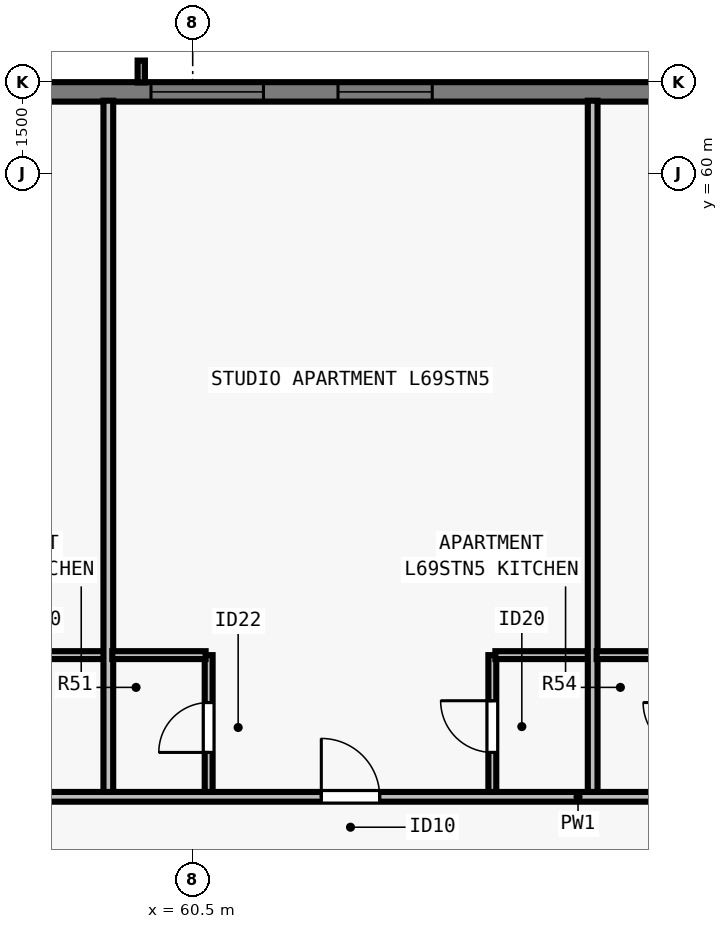
"""IFC4 building model, lengths in metres.
Left out: names, types, materials, properties, quantities, classifications, styles, units other than length and angle.
Written with IfcOpenShell. Run it as: python <this file> out.ifc"""

import sys

from ifc_helpers import new_model, si_unit, direction, frame, frame_2d, origin, place, context, subcontext, project, spatial, rectangle, extrude, element, fill, save


model = new_model("IFC4")
c1 = context("Model", 3, precision=1e-05, world=origin(), true_north=direction((0.0, 1.0)))
c2 = subcontext(c1, "Body", "Model", "MODEL_VIEW")
j1 = project(units=[si_unit("LENGTHUNIT", "METRE"), si_unit("PLANEANGLEUNIT", "RADIAN")], contexts=[c1])
p1 = place(None, origin())
s1 = spatial("IfcSite", under=j1, at=p1, CompositionType="ELEMENT")
p2 = place(p1, origin())
s2 = spatial("IfcBuilding", under=s1, at=p2, CompositionType="ELEMENT")
p3 = place(p2, frame((0.0, 0.0, 251.5)))
s3 = spatial("IfcBuildingStorey", under=s2, at=p3, CompositionType="ELEMENT", Elevation=251.5)
p4 = place(p3, frame((34.5, 61.34, 0.0), z_axis=(0.0, 0.0, 1.0), x_axis=(1.0, 0.0, 0.0)))
e1 = element("IfcWall", 1, at=p4, inside=s3, PredefinedType="SOLIDWALL", context=c2, shape_type="SweptSolid", body=[
    extrude(rectangle(XDim=34.702, YDim=0.32, at=frame_2d((17.351, 0.0))), origin(), (0.0, 0.0, 1.0), 3.29),
])
p5 = place(p4, frame((4.613, 0.0, 0.8)))
e2 = element("IfcOpeningElement", 2, at=p5, cuts=e1, PredefinedType="OPENING", context=c2, shape_type="SweptSolid", body=[
    extrude(rectangle(XDim=1.85, YDim=1.678, at=frame_2d((0.925, 0.839))), frame((0.0, 0.17, 0.0), z_axis=(0.0, -1.0, 0.0), x_axis=(1.0, 0.0, 0.0)), (0.0, 0.0, 1.0), 0.34),
])
p6 = place(p4, frame((7.688, 0.0, 0.8)))
e3 = element("IfcOpeningElement", 3, at=p6, cuts=e1, PredefinedType="OPENING", context=c2, shape_type="SweptSolid", body=[
    extrude(rectangle(XDim=1.55, YDim=1.678, at=frame_2d((0.775, 0.839))), frame((0.0, 0.17, 0.0), z_axis=(0.0, -1.0, 0.0), x_axis=(1.0, 0.0, 0.0)), (0.0, 0.0, 1.0), 0.34),
])
p7 = place(p4, frame((14.888, 0.0, 0.8)))
e4 = element("IfcOpeningElement", 4, at=p7, cuts=e1, PredefinedType="OPENING", context=c2, shape_type="SweptSolid", body=[
    extrude(rectangle(XDim=1.55, YDim=1.678, at=frame_2d((0.775, 0.839))), frame((0.0, 0.17, 0.0), z_axis=(0.0, -1.0, 0.0), x_axis=(1.0, 0.0, 0.0)), (0.0, 0.0, 1.0), 0.34),
])
p8 = place(p4, frame((18.564, 0.0, 0.8)))
e5 = element("IfcOpeningElement", 5, at=p8, cuts=e1, PredefinedType="OPENING", context=c2, shape_type="SweptSolid", body=[
    extrude(rectangle(XDim=1.85, YDim=1.678, at=frame_2d((0.925, 0.839))), frame((0.0, 0.17, 0.0), z_axis=(0.0, -1.0, 0.0), x_axis=(1.0, 0.0, 0.0)), (0.0, 0.0, 1.0), 0.34),
])
p9 = place(p4, frame((25.314, 0.0, 0.8)))
e6 = element("IfcOpeningElement", 6, at=p9, cuts=e1, PredefinedType="OPENING", context=c2, shape_type="SweptSolid", body=[
    extrude(rectangle(XDim=1.85, YDim=1.678, at=frame_2d((0.925, 0.839))), frame((0.0, 0.17, 0.0), z_axis=(0.0, -1.0, 0.0), x_axis=(1.0, 0.0, 0.0)), (0.0, 0.0, 1.0), 0.34),
])
p10 = place(p4, frame((28.389, 0.0, 0.8)))
e7 = element("IfcOpeningElement", 7, at=p10, cuts=e1, PredefinedType="OPENING", context=c2, shape_type="SweptSolid", body=[
    extrude(rectangle(XDim=1.55, YDim=1.678, at=frame_2d((0.775, 0.839))), frame((0.0, 0.17, 0.0), z_axis=(0.0, -1.0, 0.0), x_axis=(1.0, 0.0, 0.0)), (0.0, 0.0, 1.0), 0.34),
])
p11 = place(p3, frame((29.805, 49.748, 0.0), z_axis=(0.0, 0.0, 1.0), x_axis=(1.0, 0.0, 0.0)))
e8 = element("IfcWall", 8, at=p11, inside=s3, PredefinedType="PARTITIONING", context=c2, shape_type="SweptSolid", body=[
    extrude(rectangle(XDim=44.39, YDim=0.16, at=frame_2d((22.195, 0.0))), origin(), (0.0, 0.0, 1.0), 2.958),
])
p12 = place(p11, frame((3.494, 0.0, 0.0)))
e9 = element("IfcOpeningElement", 9, at=p12, cuts=e8, PredefinedType="OPENING", context=c2, shape_type="SweptSolid", body=[
    extrude(rectangle(XDim=0.96, YDim=2.18, at=frame_2d((0.48, 1.09))), frame((0.0, 0.09, 0.0), z_axis=(0.0, -1.0, 0.0), x_axis=(1.0, 0.0, 0.0)), (0.0, 0.0, 1.0), 0.18),
])
p13 = place(p11, frame((10.73, 0.0, 0.0)))
e10 = element("IfcOpeningElement", 10, at=p13, cuts=e8, PredefinedType="OPENING", context=c2, shape_type="SweptSolid", body=[
    extrude(rectangle(XDim=0.96, YDim=2.18, at=frame_2d((0.48, 1.09))), frame((0.0, 0.09, 0.0), z_axis=(0.0, -1.0, 0.0), x_axis=(1.0, 0.0, 0.0)), (0.0, 0.0, 1.0), 0.18),
])
p14 = place(p11, frame((18.09, 0.0, 0.0)))
e11 = element("IfcOpeningElement", 11, at=p14, cuts=e8, PredefinedType="OPENING", context=c2, shape_type="SweptSolid", body=[
    extrude(rectangle(XDim=0.96, YDim=2.18, at=frame_2d((0.48, 1.09))), frame((0.0, 0.09, 0.0), z_axis=(0.0, -1.0, 0.0), x_axis=(1.0, 0.0, 0.0)), (0.0, 0.0, 1.0), 0.18),
])
p15 = place(p11, frame((25.45, 0.0, 0.0)))
e12 = element("IfcOpeningElement", 12, at=p15, cuts=e8, PredefinedType="OPENING", context=c2, shape_type="SweptSolid", body=[
    extrude(rectangle(XDim=0.96, YDim=2.18, at=frame_2d((0.48, 1.09))), frame((0.0, 0.09, 0.0), z_axis=(0.0, -1.0, 0.0), x_axis=(1.0, 0.0, 0.0)), (0.0, 0.0, 1.0), 0.18),
])
p16 = place(p11, frame((32.81, 0.0, 0.0)))
e13 = element("IfcOpeningElement", 13, at=p16, cuts=e8, PredefinedType="OPENING", context=c2, shape_type="SweptSolid", body=[
    extrude(rectangle(XDim=0.96, YDim=2.18, at=frame_2d((0.48, 1.09))), frame((0.0, 0.09, 0.0), z_axis=(0.0, -1.0, 0.0), x_axis=(1.0, 0.0, 0.0)), (0.0, 0.0, 1.0), 0.18),
])
p17 = place(p11, frame((40.294, 0.0, 0.0)))
e14 = element("IfcOpeningElement", 14, at=p17, cuts=e8, PredefinedType="OPENING", context=c2, shape_type="SweptSolid", body=[
    extrude(rectangle(XDim=0.96, YDim=2.18, at=frame_2d((0.48, 1.09))), frame((0.0, 0.09, 0.0), z_axis=(0.0, -1.0, 0.0), x_axis=(1.0, 0.0, 0.0)), (0.0, 0.0, 1.0), 0.18),
])
p18 = place(p3, frame((57.512, 52.077, 0.0), z_axis=(0.0, 0.0, 1.0), x_axis=(1.0, 0.0, 0.0)))
e15 = element("IfcWall", 15, at=p18, inside=s3, PredefinedType="PLUMBINGWALL", context=c2, shape_type="SweptSolid", body=[
    extrude(rectangle(XDim=1.6, YDim=0.13, at=frame_2d((0.8, 0.0))), origin(), (0.0, 0.0, 1.0), 3.29),
])
p19 = place(p3, frame((59.113, 49.827, 0.0), z_axis=(0.0, 0.0, 1.0), x_axis=(0.0, 1.0, 0.0)))
e16 = element("IfcWall", 16, at=p19, inside=s3, PredefinedType="PARTITIONING", context=c2, shape_type="SweptSolid", body=[
    extrude(rectangle(XDim=11.368, YDim=0.16, at=frame_2d((5.684, 0.0))), origin(), (0.0, 0.0, 1.0), 3.29),
])
p20 = place(p3, frame((60.762, 49.827, 0.0), z_axis=(0.0, 0.0, 1.0), x_axis=(0.0, 1.0, 0.0)))
e17 = element("IfcWall", 17, at=p20, inside=s3, PredefinedType="PLUMBINGWALL", context=c2, shape_type="SweptSolid", body=[
    extrude(rectangle(XDim=2.25, YDim=0.13, at=frame_2d((1.125, 0.0))), origin(), (0.0, 0.0, 1.0), 3.29),
])
p21 = place(p20, frame((0.65, 0.0, 0.0)))
e18 = element("IfcOpeningElement", 18, at=p21, cuts=e17, PredefinedType="OPENING", context=c2, shape_type="SweptSolid", body=[
    extrude(rectangle(XDim=0.82, YDim=2.1, at=frame_2d((0.41, 1.05))), frame((0.0, 0.075, 0.0), z_axis=(0.0, -1.0, 0.0), x_axis=(1.0, 0.0, 0.0)), (0.0, 0.0, 1.0), 0.15),
])
p22 = place(p3, frame((59.177, 52.077, 0.0), z_axis=(0.0, 0.0, 1.0), x_axis=(1.0, 0.0, 0.0)))
e19 = element("IfcWall", 19, at=p22, inside=s3, PredefinedType="PLUMBINGWALL", context=c2, shape_type="SweptSolid", body=[
    extrude(rectangle(XDim=1.535, YDim=0.13, at=frame_2d((0.768, 0.0))), origin(), (0.0, 0.0, 1.0), 3.29),
])
p23 = place(p3, frame((65.427, 49.827, 0.0), z_axis=(0.0, 0.0, 1.0), x_axis=(0.0, 1.0, 0.0)))
e20 = element("IfcWall", 20, at=p23, inside=s3, PredefinedType="PLUMBINGWALL", context=c2, shape_type="SweptSolid", body=[
    extrude(rectangle(XDim=2.25, YDim=0.13, at=frame_2d((1.125, 0.0))), origin(), (0.0, 0.0, 1.0), 3.29),
])
p24 = place(p23, frame((0.65, 0.0, 0.0)))
e21 = element("IfcOpeningElement", 21, at=p24, cuts=e20, PredefinedType="OPENING", context=c2, shape_type="SweptSolid", body=[
    extrude(rectangle(XDim=0.85, YDim=2.1, at=frame_2d((0.425, 1.05))), frame((0.0, 0.075, 0.0), z_axis=(0.0, -1.0, 0.0), x_axis=(1.0, 0.0, 0.0)), (0.0, 0.0, 1.0), 0.15),
])
p25 = place(p3, frame((65.478, 52.077, 0.0), z_axis=(0.0, 0.0, 1.0), x_axis=(1.0, 0.0, 0.0)))
e22 = element("IfcWall", 22, at=p25, inside=s3, PredefinedType="PLUMBINGWALL", context=c2, shape_type="SweptSolid", body=[
    extrude(rectangle(XDim=1.6, YDim=0.13, at=frame_2d((0.8, 0.0))), origin(), (0.0, 0.0, 1.0), 3.29),
])
p26 = place(p3, frame((67.077, 49.827, 0.0), z_axis=(0.0, 0.0, 1.0), x_axis=(0.0, 1.0, 0.0)))
e23 = element("IfcWall", 23, at=p26, inside=s3, PredefinedType="PARTITIONING", context=c2, shape_type="SweptSolid", body=[
    extrude(rectangle(XDim=11.368, YDim=0.16, at=frame_2d((5.684, 0.0))), origin(), (0.0, 0.0, 1.0), 2.573),
])
p27 = place(p3, frame((67.143, 52.077, 0.0), z_axis=(0.0, 0.0, 1.0), x_axis=(1.0, 0.0, 0.0)))
e24 = element("IfcWall", 24, at=p27, inside=s3, PredefinedType="PLUMBINGWALL", context=c2, shape_type="SweptSolid", body=[
    extrude(rectangle(XDim=1.535, YDim=0.13, at=frame_2d((0.768, 0.0))), origin(), (0.0, 0.0, 1.0), 2.958),
])
p28 = place(p9, origin())
e25 = element("IfcWindow", 25, at=p28, inside=s3, PartitioningType="SINGLE_PANEL", PredefinedType="WINDOW", context=c2, shape_type="SweptSolid", body=[
    extrude(rectangle(XDim=1.85, YDim=1.678, at=frame_2d((0.925, 0.839))), frame((0.0, -0.05, 0.0), z_axis=(0.0, -1.0, 0.0), x_axis=(1.0, 0.0, 0.0)), (0.0, 0.0, 1.0), 0.06),
])
fill(e6, e25)
p29 = place(p10, origin())
e26 = element("IfcWindow", 26, at=p29, inside=s3, PartitioningType="SINGLE_PANEL", PredefinedType="WINDOW", context=c2, shape_type="SweptSolid", body=[
    extrude(rectangle(XDim=1.55, YDim=1.678, at=frame_2d((0.775, 0.839))), frame((0.0, -0.05, 0.0), z_axis=(0.0, -1.0, 0.0), x_axis=(1.0, 0.0, 0.0)), (0.0, 0.0, 1.0), 0.06),
])
fill(e7, e26)
p30 = place(p21, origin())
e27 = element("IfcDoor", 27, at=p30, inside=s3, OperationType="SINGLE_SWING_LEFT", PredefinedType="DOOR", context=c2, shape_type="SweptSolid", body=[
    extrude(rectangle(XDim=0.82, YDim=2.1, at=frame_2d((0.41, 1.05))), frame((0.0, 0.025, 0.0), z_axis=(0.0, -1.0, 0.0), x_axis=(1.0, 0.0, 0.0)), (0.0, 0.0, 1.0), 0.05),
])
fill(e18, e27)
p31 = place(p24, origin())
e28 = element("IfcDoor", 28, at=p31, inside=s3, OperationType="SINGLE_SWING_RIGHT", PredefinedType="DOOR", context=c2, shape_type="SweptSolid", body=[
    extrude(rectangle(XDim=0.85, YDim=2.1, at=frame_2d((0.425, 1.05))), frame((0.0, 0.025, 0.0), z_axis=(0.0, -1.0, 0.0), x_axis=(1.0, 0.0, 0.0)), (0.0, 0.0, 1.0), 0.05),
])
fill(e21, e28)
p32 = place(p16, origin())
e29 = element("IfcDoor", 29, at=p32, inside=s3, OperationType="SINGLE_SWING_LEFT", PredefinedType="DOOR", context=c2, shape_type="SweptSolid", body=[
    extrude(rectangle(XDim=0.96, YDim=2.18, at=frame_2d((0.48, 1.09))), frame((0.0, 0.025, 0.0), z_axis=(0.0, -1.0, 0.0), x_axis=(1.0, 0.0, 0.0)), (0.0, 0.0, 1.0), 0.05),
])
fill(e13, e29)
save(model, sys.argv[1])
